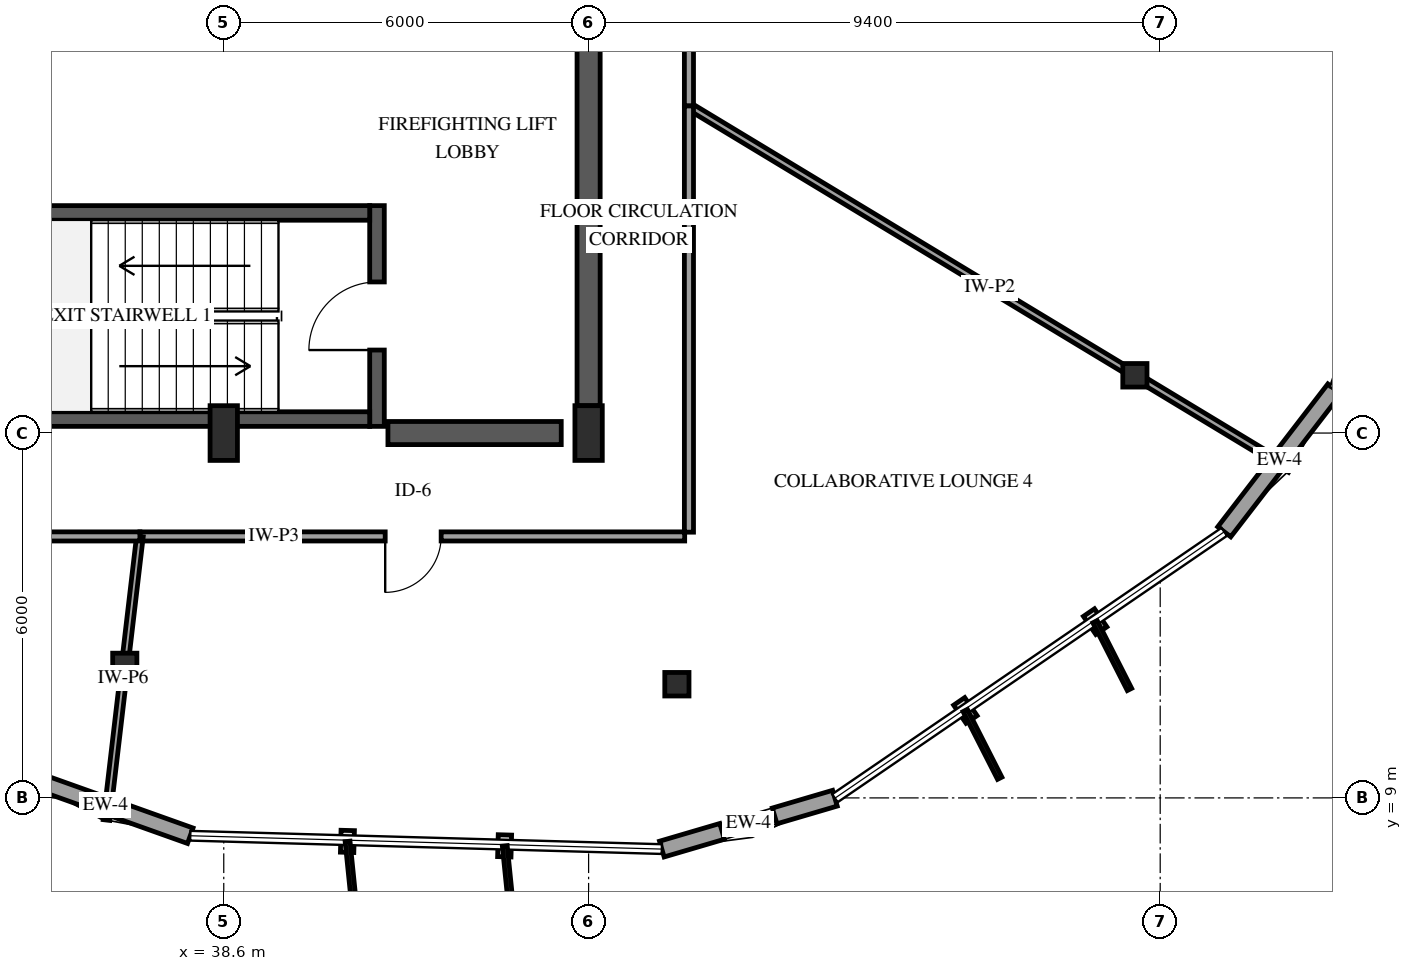
"""IFC4 building model, lengths in metres.
Left out: names, types, materials, properties, quantities, classifications, styles, units other than length and angle.
Written with IfcOpenShell. Run it as: python <this file> out.ifc"""

import sys

from ifc_helpers import new_model, si_unit, direction, frame, frame_2d, origin, origin_2d, place, context, subcontext, project, spatial, rectangle, i_section, extrude, element, fill, save


model = new_model("IFC4")
c1 = context("Model", 3, precision=1e-05, world=origin(), true_north=direction((0.0, 1.0)))
c2 = subcontext(c1, "Body", "Model", "MODEL_VIEW")
j1 = project(units=[si_unit("LENGTHUNIT", "METRE"), si_unit("PLANEANGLEUNIT", "RADIAN")], contexts=[c1])
p1 = place(None, origin())
s1 = spatial("IfcSite", under=j1, at=p1, CompositionType="ELEMENT")
p2 = place(p1, origin())
s2 = spatial("IfcBuilding", under=s1, at=p2, CompositionType="ELEMENT")
p3 = place(p2, frame((0.0, 0.0, 293.05)))
s3 = spatial("IfcBuildingStorey", under=s2, at=p3, CompositionType="ELEMENT", Elevation=293.05)
p4 = place(p3, frame((41.12, 15.11, 0.0), z_axis=(0.0, 0.0, 1.0), x_axis=(0.0, 1.0, 0.0)))
e1 = element("IfcWall", 1, at=p4, inside=s3, PredefinedType="SHEAR", context=c2, shape_type="SweptSolid", body=[
    extrude(rectangle(XDim=3.63, YDim=0.24, at=frame_2d((1.815, 0.0))), origin(), (0.0, 0.0, 1.0), 4.2),
])
p5 = place(p4, frame((1.255, 0.0, 0.0)))
e2 = element("IfcOpeningElement", 2, at=p5, cuts=e1, PredefinedType="OPENING", context=c2, shape_type="SweptSolid", body=[
    extrude(rectangle(XDim=1.12, YDim=2.15, at=frame_2d((0.56, 1.075))), frame((0.0, 0.13, 0.0), z_axis=(0.0, -1.0, 0.0), x_axis=(1.0, 0.0, 0.0)), (0.0, 0.0, 1.0), 0.26),
])
for number, where, z_axis, x_axis in (
    (3, (33.0, 15.23, 0.0), (0.0, 0.0, 1.0), (1.0, 0.0, 0.0)),
    (4, (33.0, 18.62, 0.0), (0.0, 0.0, 1.0), (1.0, 0.0, 0.0)),
):
    element("IfcWall", number, at=place(p3, frame(where, z_axis=z_axis, x_axis=x_axis)), inside=s3, PredefinedType="SHEAR", context=c2, shape_type="SweptSolid", body=[
        extrude(rectangle(XDim=8.0, YDim=0.24, at=frame_2d((4.0, 0.0))), origin(), (0.0, 0.0, 1.0), 4.2),
    ])
p6 = place(p3, frame((41.3, 15.0, 0.0), z_axis=(0.0, 0.0, 1.0), x_axis=(1.0, 0.0, 0.0)))
e5 = element("IfcWall", 5, at=p6, inside=s3, PredefinedType="SHEAR", context=c2, shape_type="SweptSolid", body=[
    extrude(rectangle(XDim=2.85, YDim=0.38, at=frame_2d((1.425, 0.0))), origin(), (0.0, 0.0, 1.0), 4.2),
])
p7 = place(p3, frame((44.6, 15.45, 0.0), z_axis=(0.0, 0.0, 1.0), x_axis=(0.0, 1.0, 0.0)))
e6 = element("IfcWall", 6, at=p7, inside=s3, PredefinedType="SHEAR", context=c2, shape_type="SweptSolid", body=[
    extrude(rectangle(XDim=6.35, YDim=0.38, at=frame_2d((3.175, 0.0))), origin(), (0.0, 0.0, 1.0), 4.2),
])
for number, where, z_axis, x_axis in (
    (7, (38.6, 15.0, -0.305), (0.0, 0.0, 1.0), (1.0, 0.0, 0.0)),
    (8, (44.6, 15.0, -0.305), (0.0, 0.0, 1.0), (1.0, 0.0, 0.0)),
):
    element("IfcColumn", number, at=place(p3, frame(where, z_axis=z_axis, x_axis=x_axis)), inside=s3, PredefinedType="PILASTER", context=c2, shape_type="SweptSolid", body=[
        extrude(rectangle(XDim=0.45, YDim=0.9, at=origin_2d()), origin(), (0.0, 0.0, 1.0), 4.505),
    ])
for number, where, z_axis, x_axis in (
    (9, (36.972, 11.187, -0.305), (0.0, 0.0, 1.0), (1.0, 0.0, 0.0)),
    (10, (46.052, 10.869, -0.305), (0.0, 0.0, 1.0), (1.0, 0.0, 0.0)),
    (11, (53.584, 15.95, -0.305), (0.0, 0.0, 1.0), (1.0, 0.0, 0.0)),
):
    element("IfcColumn", number, at=place(p3, frame(where, z_axis=z_axis, x_axis=x_axis)), inside=s3, PredefinedType="COLUMN", context=c2, shape_type="SweptSolid", body=[
        extrude(i_section(OverallWidth=0.398, OverallDepth=0.387, WebThickness=0.021, FlangeThickness=0.033, FilletRadius=0.038, at=origin_2d()), origin(), (0.0, 0.0, 1.0), 4.505),
    ])
p8 = place(p3, frame((35.255, 9.374, 0.0), z_axis=(0.0, 0.0, 1.0), x_axis=(0.941946543117, -0.335762877505, 0.0)))
e12 = element("IfcWall", 12, at=p8, inside=s3, PredefinedType="SOLIDWALL", context=c2, shape_type="SweptSolid", body=[
    extrude(rectangle(XDim=2.967, YDim=0.27, at=frame_2d((1.483, 0.0))), origin(), (0.0, 0.0, 1.0), 3.274),
])
p9 = place(p3, frame((45.804, 8.158, 0.0), z_axis=(0.0, 0.0, 1.0), x_axis=(0.959406115423, 0.282028200168, 0.0)))
e13 = element("IfcWall", 13, at=p9, inside=s3, PredefinedType="SOLIDWALL", context=c2, shape_type="SweptSolid", body=[
    extrude(rectangle(XDim=2.967, YDim=0.27, at=frame_2d((1.483, 0.0))), origin(), (0.0, 0.0, 1.0), 3.274),
])
p10 = place(p9, frame((1.033, 0.0, 0.75)))
e14 = element("IfcOpeningElement", 14, at=p10, cuts=e13, PredefinedType="OPENING", context=c2, shape_type="SweptSolid", body=[
    extrude(rectangle(XDim=0.9, YDim=1.5, at=frame_2d((0.45, 0.75))), frame((0.0, 0.145, 0.0), z_axis=(0.0, -1.0, 0.0), x_axis=(1.0, 0.0, 0.0)), (0.0, 0.0, 1.0), 0.29),
])
p11 = place(p3, frame((55.053, 13.376, 0.0), z_axis=(0.0, 0.0, 1.0), x_axis=(0.61043041825, 0.792069886105, 0.0)))
e15 = element("IfcWall", 15, at=p11, inside=s3, PredefinedType="SOLIDWALL", context=c2, shape_type="SweptSolid", body=[
    extrude(rectangle(XDim=2.966, YDim=0.27, at=frame_2d((1.483, 0.0))), origin(), (0.0, 0.0, 1.0), 3.274),
])
p12 = place(p3, frame((46.25, 20.379, 0.0), z_axis=(0.0, 0.0, 1.0), x_axis=(0.856014879115, -0.516951184092, 0.0)))
e16 = element("IfcWall", 16, at=p12, inside=s3, PredefinedType="PARTITIONING", context=c2, shape_type="SweptSolid", body=[
    extrude(rectangle(XDim=11.556, YDim=0.12, at=frame_2d((5.778, 0.0))), origin(), (0.0, 0.0, 1.0), 3.273),
])
p13 = place(p3, frame((46.18, 13.3, 0.0), z_axis=(0.0, 0.0, 1.0), x_axis=(-1.0, 0.0, 0.0)))
e17 = element("IfcWall", 17, at=p13, inside=s3, PredefinedType="PARTITIONING", context=c2, shape_type="SweptSolid", body=[
    extrude(rectangle(XDim=8.959, YDim=0.15, at=frame_2d((4.479, 0.0))), origin(), (0.0, 0.0, 1.0), 3.895),
])
p14 = place(p13, frame((4.005, 0.0, 0.0)))
e18 = element("IfcOpeningElement", 18, at=p14, cuts=e17, PredefinedType="OPENING", context=c2, shape_type="SweptSolid", body=[
    extrude(rectangle(XDim=0.92, YDim=2.12, at=frame_2d((0.46, 1.06))), frame((0.0, 0.085, 0.0), z_axis=(0.0, -1.0, 0.0), x_axis=(1.0, 0.0, 0.0)), (0.0, 0.0, 1.0), 0.17),
])
p15 = place(p3, frame((46.25, 29.035, 0.0), z_axis=(0.0, 0.0, 1.0), x_axis=(0.0, -1.0, 0.0)))
e19 = element("IfcWall", 19, at=p15, inside=s3, PredefinedType="PARTITIONING", context=c2, shape_type="SweptSolid", body=[
    extrude(rectangle(XDim=8.656, YDim=0.15, at=frame_2d((4.328, 0.0))), origin(), (0.0, 0.0, 1.0), 3.895),
])
p16 = place(p15, frame((3.853, 0.0, 0.0)))
e20 = element("IfcOpeningElement", 20, at=p16, cuts=e19, PredefinedType="OPENING", context=c2, shape_type="SweptSolid", body=[
    extrude(rectangle(XDim=0.92, YDim=2.12, at=frame_2d((0.46, 1.06))), frame((0.0, 0.085, 0.0), z_axis=(0.0, -1.0, 0.0), x_axis=(1.0, 0.0, 0.0)), (0.0, 0.0, 1.0), 0.17),
])
p17 = place(p3, frame((46.25, 20.379, 0.0), z_axis=(0.0, 0.0, 1.0), x_axis=(0.0, -1.0, 0.0)))
e21 = element("IfcWall", 21, at=p17, inside=s3, PredefinedType="PARTITIONING", context=c2, shape_type="SweptSolid", body=[
    extrude(rectangle(XDim=7.009, YDim=0.15, at=frame_2d((3.504, 0.0))), origin(), (0.0, 0.0, 1.0), 3.895),
])
p18 = place(p3, frame((37.221, 13.3, 0.0), z_axis=(0.0, 0.0, 1.0), x_axis=(-0.116865377729, -0.993147765183, 0.0)))
e22 = element("IfcWall", 22, at=p18, inside=s3, PredefinedType="PARTITIONING", context=c2, shape_type="SweptSolid", body=[
    extrude(rectangle(XDim=4.696, YDim=0.11, at=frame_2d((2.348, 0.0))), origin(), (0.0, 0.0, 1.0), 3.895),
])
p19 = place(p3, frame((37.221, 13.3, 0.0), z_axis=(0.0, 0.0, 1.0), x_axis=(-1.0, 0.0, 0.0)))
e23 = element("IfcWall", 23, at=p19, inside=s3, PredefinedType="PARTITIONING", context=c2, shape_type="SweptSolid", body=[
    extrude(rectangle(XDim=4.551, YDim=0.15, at=frame_2d((2.275, 0.0))), origin(), (0.0, 0.0, 1.0), 3.895),
])
p20 = place(p19, frame((1.8, 0.0, 0.0)))
e24 = element("IfcOpeningElement", 24, at=p20, cuts=e23, PredefinedType="OPENING", context=c2, shape_type="SweptSolid", body=[
    extrude(rectangle(XDim=0.92, YDim=2.12, at=frame_2d((0.46, 1.06))), frame((0.0, 0.085, 0.0), z_axis=(0.0, -1.0, 0.0), x_axis=(1.0, 0.0, 0.0)), (0.0, 0.0, 1.0), 0.17),
])
p21 = place(p10, origin())
e25 = element("IfcWindow", 25, at=p21, inside=s3, PartitioningType="SINGLE_PANEL", PredefinedType="WINDOW", context=c2, shape_type="SweptSolid", body=[
    extrude(rectangle(XDim=0.9, YDim=1.5, at=frame_2d((0.45, 0.75))), frame((0.0, 0.03, 0.0), z_axis=(0.0, -1.0, 0.0), x_axis=(1.0, 0.0, 0.0)), (0.0, 0.0, 1.0), 0.06),
])
fill(e14, e25)
p22 = place(p5, origin())
e26 = element("IfcDoor", 26, at=p22, inside=s3, OperationType="SINGLE_SWING_LEFT", PredefinedType="DOOR", context=c2, shape_type="SweptSolid", body=[
    extrude(rectangle(XDim=1.12, YDim=2.15, at=frame_2d((0.56, 1.075))), frame((0.0, 0.025, 0.0), z_axis=(0.0, -1.0, 0.0), x_axis=(1.0, 0.0, 0.0)), (0.0, 0.0, 1.0), 0.05),
])
fill(e2, e26)
p23 = place(p14, origin())
e27 = element("IfcDoor", 27, at=p23, inside=s3, OperationType="SINGLE_SWING_RIGHT", PredefinedType="DOOR", context=c2, shape_type="SweptSolid", body=[
    extrude(rectangle(XDim=0.92, YDim=2.12, at=frame_2d((0.46, 1.06))), frame((0.0, 0.025, 0.0), z_axis=(0.0, -1.0, 0.0), x_axis=(1.0, 0.0, 0.0)), (0.0, 0.0, 1.0), 0.05),
])
fill(e18, e27)
save(model, sys.argv[1])
